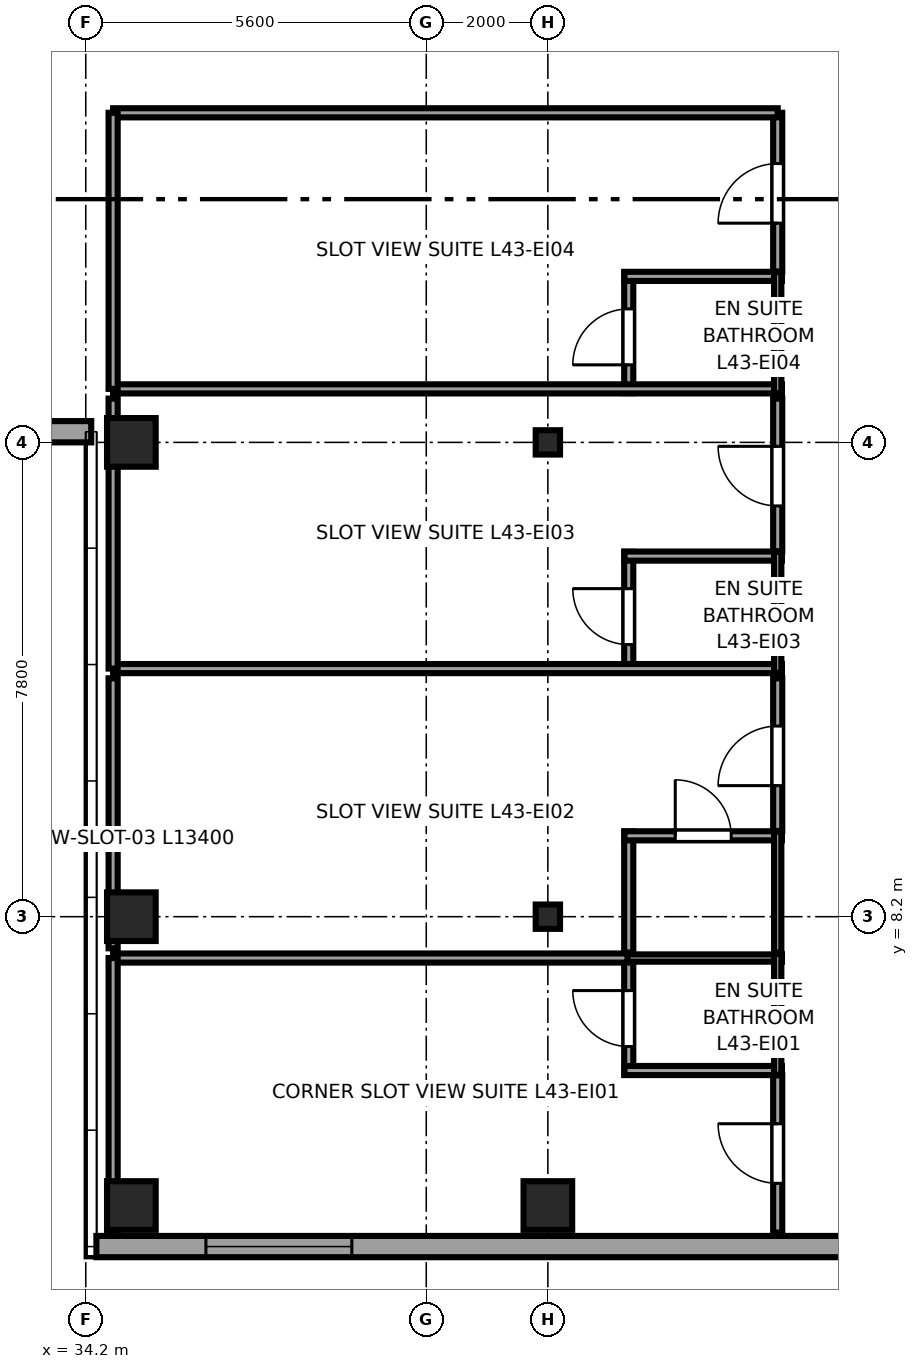
"""IFC4 building model, lengths in metres.
Left out: names, types, materials, properties, quantities, classifications, styles, units other than length and angle.
Written with IfcOpenShell. Run it as: python <this file> out.ifc"""

import sys

from ifc_helpers import new_model, si_unit, direction, frame, frame_2d, origin, origin_2d, place, context, subcontext, project, spatial, rectangle, i_section, extrude, source, transform, mapped, element, fill, save


model = new_model("IFC4")
c1 = context("Model", 3, precision=1e-05, world=origin(), true_north=direction((0.0, 1.0)))
c2 = subcontext(c1, "Body", "Model", "MODEL_VIEW")
j1 = project(units=[si_unit("LENGTHUNIT", "METRE"), si_unit("PLANEANGLEUNIT", "RADIAN")], contexts=[c1])
p1 = place(None, origin())
s1 = spatial("IfcSite", under=j1, at=p1, CompositionType="ELEMENT")
p2 = place(p1, origin())
s2 = spatial("IfcBuilding", under=s1, at=p2, CompositionType="ELEMENT")
p3 = place(p2, frame((0.0, 0.0, 164.8)))
s3 = spatial("IfcBuildingStorey", under=s2, at=p3, CompositionType="ELEMENT", Elevation=164.8)
m1 = source(origin(), c2, "Body", "SweptSolid", [
    extrude(rectangle(XDim=0.8, YDim=0.8, at=origin_2d()), origin(), (0.0, 0.0, 1.0), 3.55),
])
for number, where, z_axis, x_axis in (
    (1, (34.95, 3.45, 0.0), (0.0, 0.0, 1.0), (1.0, 0.0, 0.0)),
    (2, (34.95, 8.2, 0.0), (0.0, 0.0, 1.0), (1.0, 0.0, 0.0)),
    (3, (34.95, 16.0, 0.0), (0.0, 0.0, 1.0), (1.0, 0.0, 0.0)),
    (4, (41.8, 3.45, 0.0), (0.0, 0.0, 1.0), (1.0, 0.0, 0.0)),
):
    element("IfcColumn", number, at=place(p3, frame(where, z_axis=z_axis, x_axis=x_axis)), inside=s3, PredefinedType="COLUMN", context=c2, shape_type="MappedRepresentation", body=[
        mapped(m1, transform((0.0, 0.0, 0.0), x_axis=(1.0, 0.0, 0.0), y_axis=(0.0, 1.0, 0.0), z_axis=(0.0, 0.0, 1.0), scale=1.0)),
    ])
m2 = source(origin(), c2, "Body", "SweptSolid", [
    extrude(i_section(OverallWidth=0.4, OverallDepth=0.4, WebThickness=0.02, FlangeThickness=0.035, at=origin_2d()), origin(), (0.0, 0.0, 1.0), 3.55),
])
for number, where, z_axis, x_axis in (
    (5, (41.8, 8.2, 0.0), (0.0, 0.0, 1.0), (1.0, 0.0, 0.0)),
    (6, (41.8, 16.0, 0.0), (0.0, 0.0, 1.0), (1.0, 0.0, 0.0)),
):
    element("IfcColumn", number, at=place(p3, frame(where, z_axis=z_axis, x_axis=x_axis)), inside=s3, PredefinedType="COLUMN", context=c2, shape_type="MappedRepresentation", body=[
        mapped(m2, transform((0.0, 0.0, 0.0), x_axis=(1.0, 0.0, 0.0), y_axis=(0.0, 1.0, 0.0), z_axis=(0.0, 0.0, 1.0), scale=1.0)),
    ])
p4 = place(p3, frame((22.71, 16.175, 0.0), z_axis=(0.0, 0.0, 1.0), x_axis=(1.0, 0.0, 0.0)))
e7 = element("IfcWall", 7, at=p4, inside=s3, PredefinedType="SOLIDWALL", context=c2, shape_type="SweptSolid", body=[
    extrude(rectangle(XDim=11.58, YDim=0.35, at=frame_2d((5.79, 0.0))), origin(), (0.0, 0.0, 1.0), 2.758),
])
p5 = place(p4, frame((1.995, 0.0, 0.68)))
e8 = element("IfcOpeningElement", 8, at=p5, cuts=e7, PredefinedType="OPENING", context=c2, shape_type="SweptSolid", body=[
    extrude(rectangle(XDim=2.4, YDim=1.9, at=frame_2d((1.2, 0.95))), frame((0.0, 0.185, 0.0), z_axis=(0.0, -1.0, 0.0), x_axis=(1.0, 0.0, 0.0)), (0.0, 0.0, 1.0), 0.37),
])
p6 = place(p4, frame((7.185, 0.0, 0.68)))
e9 = element("IfcOpeningElement", 9, at=p6, cuts=e7, PredefinedType="OPENING", context=c2, shape_type="SweptSolid", body=[
    extrude(rectangle(XDim=2.4, YDim=1.9, at=frame_2d((1.2, 0.95))), frame((0.0, 0.185, 0.0), z_axis=(0.0, -1.0, 0.0), x_axis=(1.0, 0.0, 0.0)), (0.0, 0.0, 1.0), 0.37),
])
p7 = place(p3, frame((34.375, 2.775, 0.0), z_axis=(0.0, 0.0, 1.0), x_axis=(1.0, 0.0, 0.0)))
e10 = element("IfcWall", 10, at=p7, inside=s3, PredefinedType="SOLIDWALL", context=c2, shape_type="SweptSolid", body=[
    extrude(rectangle(XDim=15.608, YDim=0.35, at=frame_2d((7.804, 0.0))), origin(), (0.0, 0.0, 1.0), 3.37),
])
p8 = place(p7, frame((1.801, 0.0, 0.68)))
e11 = element("IfcOpeningElement", 11, at=p8, cuts=e10, PredefinedType="OPENING", context=c2, shape_type="SweptSolid", body=[
    extrude(rectangle(XDim=2.4, YDim=1.9, at=frame_2d((1.2, 0.95))), frame((0.0, 0.185, 0.0), z_axis=(0.0, -1.0, 0.0), x_axis=(1.0, 0.0, 0.0)), (0.0, 0.0, 1.0), 0.37),
])
p9 = place(p7, frame((13.616, 0.0, 0.62)))
e12 = element("IfcOpeningElement", 12, at=p9, cuts=e10, PredefinedType="OPENING", context=c2, shape_type="SweptSolid", body=[
    extrude(rectangle(XDim=1.5, YDim=1.55, at=frame_2d((0.75, 0.775))), frame((0.0, 0.185, 0.0), z_axis=(0.0, -1.0, 0.0), x_axis=(1.0, 0.0, 0.0)), (0.0, 0.0, 1.0), 0.37),
])
p10 = place(p3, frame((43.13, 5.6, 0.0), z_axis=(0.0, 0.0, 1.0), x_axis=(0.0, 1.0, 0.0)))
e13 = element("IfcWall", 13, at=p10, inside=s3, PredefinedType="PARTITIONING", context=c2, shape_type="SweptSolid", body=[
    extrude(rectangle(XDim=1.99, YDim=0.15, at=frame_2d((0.995, 0.0))), origin(), (0.0, 0.0, 1.0), 3.37),
])
p11 = place(p10, frame((0.465, 0.0, 0.0)))
e14 = element("IfcOpeningElement", 14, at=p11, cuts=e13, PredefinedType="OPENING", context=c2, shape_type="SweptSolid", body=[
    extrude(rectangle(XDim=0.92, YDim=2.01, at=frame_2d((0.46, 1.005))), frame((0.0, 0.085, 0.0), z_axis=(0.0, -1.0, 0.0), x_axis=(1.0, 0.0, 0.0)), (0.0, 0.0, 1.0), 0.17),
])
p12 = place(p3, frame((43.06, 5.67, 0.0), z_axis=(0.0, 0.0, 1.0), x_axis=(1.0, 0.0, 0.0)))
e15 = element("IfcWall", 15, at=p12, inside=s3, PredefinedType="PARTITIONING", context=c2, shape_type="SweptSolid", body=[
    extrude(rectangle(XDim=2.59, YDim=0.15, at=frame_2d((1.295, 0.0))), origin(), (0.0, 0.0, 1.0), 3.37),
])
p13 = place(p3, frame((43.06, 7.52, 0.0), z_axis=(0.0, 0.0, 1.0), x_axis=(1.0, 0.0, 0.0)))
e16 = element("IfcWall", 16, at=p13, inside=s3, PredefinedType="PLUMBINGWALL", context=c2, shape_type="SweptSolid", body=[
    extrude(rectangle(XDim=2.59, YDim=0.12, at=frame_2d((1.295, 0.0))), origin(), (0.0, 0.0, 1.0), 3.37),
])
p14 = place(p3, frame((45.58, 5.6, 0.0), z_axis=(0.0, 0.0, 1.0), x_axis=(0.0, 1.0, 0.0)))
e17 = element("IfcWall", 17, at=p14, inside=s3, PredefinedType="PLUMBINGWALL", context=c2, shape_type="SweptSolid", body=[
    extrude(rectangle(XDim=1.99, YDim=0.12, at=frame_2d((0.995, 0.0))), origin(), (0.0, 0.0, 1.0), 3.37),
])
p15 = place(p3, frame((43.13, 7.61, 0.0), z_axis=(0.0, 0.0, 1.0), x_axis=(0.0, 1.0, 0.0)))
e18 = element("IfcWall", 18, at=p15, inside=s3, PredefinedType="PARTITIONING", context=c2, shape_type="SweptSolid", body=[
    extrude(rectangle(XDim=1.99, YDim=0.15, at=frame_2d((0.995, 0.0))), origin(), (0.0, 0.0, 1.0), 3.37),
])
p16 = place(p3, frame((43.06, 9.53, 0.0), z_axis=(0.0, 0.0, 1.0), x_axis=(1.0, 0.0, 0.0)))
e19 = element("IfcWall", 19, at=p16, inside=s3, PredefinedType="PARTITIONING", context=c2, shape_type="SweptSolid", body=[
    extrude(rectangle(XDim=2.59, YDim=0.15, at=frame_2d((1.295, 0.0))), origin(), (0.0, 0.0, 1.0), 3.37),
])
p17 = place(p16, frame((0.835, 0.0, 0.0)))
e20 = element("IfcOpeningElement", 20, at=p17, cuts=e19, PredefinedType="OPENING", context=c2, shape_type="SweptSolid", body=[
    extrude(rectangle(XDim=0.92, YDim=2.01, at=frame_2d((0.46, 1.005))), frame((0.0, 0.085, 0.0), z_axis=(0.0, -1.0, 0.0), x_axis=(1.0, 0.0, 0.0)), (0.0, 0.0, 1.0), 0.17),
])
p18 = place(p3, frame((45.58, 7.61, 0.0), z_axis=(0.0, 0.0, 1.0), x_axis=(0.0, 1.0, 0.0)))
e21 = element("IfcWall", 21, at=p18, inside=s3, PredefinedType="PLUMBINGWALL", context=c2, shape_type="SweptSolid", body=[
    extrude(rectangle(XDim=1.99, YDim=0.12, at=frame_2d((0.995, 0.0))), origin(), (0.0, 0.0, 1.0), 3.001),
])
p19 = place(p3, frame((43.13, 12.21, 0.0), z_axis=(0.0, 0.0, 1.0), x_axis=(0.0, 1.0, 0.0)))
e22 = element("IfcWall", 22, at=p19, inside=s3, PredefinedType="PARTITIONING", context=c2, shape_type="SweptSolid", body=[
    extrude(rectangle(XDim=1.99, YDim=0.15, at=frame_2d((0.995, 0.0))), origin(), (0.0, 0.0, 1.0), 3.37),
])
p20 = place(p19, frame((0.465, 0.0, 0.0)))
e23 = element("IfcOpeningElement", 23, at=p20, cuts=e22, PredefinedType="OPENING", context=c2, shape_type="SweptSolid", body=[
    extrude(rectangle(XDim=0.92, YDim=2.01, at=frame_2d((0.46, 1.005))), frame((0.0, 0.085, 0.0), z_axis=(0.0, -1.0, 0.0), x_axis=(1.0, 0.0, 0.0)), (0.0, 0.0, 1.0), 0.17),
])
p21 = place(p3, frame((34.65, 12.28, 0.0), z_axis=(0.0, 0.0, 1.0), x_axis=(1.0, 0.0, 0.0)))
e24 = element("IfcWall", 24, at=p21, inside=s3, PredefinedType="PARTITIONING", context=c2, shape_type="SweptSolid", body=[
    extrude(rectangle(XDim=11.0, YDim=0.15, at=frame_2d((5.5, 0.0))), origin(), (0.0, 0.0, 1.0), 3.37),
])
p22 = place(p3, frame((43.06, 14.13, 0.0), z_axis=(0.0, 0.0, 1.0), x_axis=(1.0, 0.0, 0.0)))
e25 = element("IfcWall", 25, at=p22, inside=s3, PredefinedType="PARTITIONING", context=c2, shape_type="SweptSolid", body=[
    extrude(rectangle(XDim=2.59, YDim=0.15, at=frame_2d((1.295, 0.0))), origin(), (0.0, 0.0, 1.0), 3.37),
])
p23 = place(p3, frame((45.58, 12.21, 0.0), z_axis=(0.0, 0.0, 1.0), x_axis=(0.0, 1.0, 0.0)))
e26 = element("IfcWall", 26, at=p23, inside=s3, PredefinedType="PLUMBINGWALL", context=c2, shape_type="SweptSolid", body=[
    extrude(rectangle(XDim=1.99, YDim=0.12, at=frame_2d((0.995, 0.0))), origin(), (0.0, 0.0, 1.0), 3.001),
])
p24 = place(p3, frame((43.13, 16.81, 0.0), z_axis=(0.0, 0.0, 1.0), x_axis=(0.0, 1.0, 0.0)))
e27 = element("IfcWall", 27, at=p24, inside=s3, PredefinedType="PARTITIONING", context=c2, shape_type="SweptSolid", body=[
    extrude(rectangle(XDim=1.99, YDim=0.15, at=frame_2d((0.995, 0.0))), origin(), (0.0, 0.0, 1.0), 3.37),
])
p25 = place(p24, frame((0.465, 0.0, 0.0)))
e28 = element("IfcOpeningElement", 28, at=p25, cuts=e27, PredefinedType="OPENING", context=c2, shape_type="SweptSolid", body=[
    extrude(rectangle(XDim=0.92, YDim=2.01, at=frame_2d((0.46, 1.005))), frame((0.0, 0.085, 0.0), z_axis=(0.0, -1.0, 0.0), x_axis=(1.0, 0.0, 0.0)), (0.0, 0.0, 1.0), 0.17),
])
p26 = place(p3, frame((34.65, 16.88, 0.0), z_axis=(0.0, 0.0, 1.0), x_axis=(1.0, 0.0, 0.0)))
e29 = element("IfcWall", 29, at=p26, inside=s3, PredefinedType="PARTITIONING", context=c2, shape_type="SweptSolid", body=[
    extrude(rectangle(XDim=11.0, YDim=0.15, at=frame_2d((5.5, 0.0))), origin(), (0.0, 0.0, 1.0), 3.37),
])
p27 = place(p3, frame((43.06, 18.73, 0.0), z_axis=(0.0, 0.0, 1.0), x_axis=(1.0, 0.0, 0.0)))
e30 = element("IfcWall", 30, at=p27, inside=s3, PredefinedType="PARTITIONING", context=c2, shape_type="SweptSolid", body=[
    extrude(rectangle(XDim=2.59, YDim=0.15, at=frame_2d((1.295, 0.0))), origin(), (0.0, 0.0, 1.0), 3.37),
])
p28 = place(p3, frame((45.58, 16.81, 0.0), z_axis=(0.0, 0.0, 1.0), x_axis=(0.0, 1.0, 0.0)))
e31 = element("IfcWall", 31, at=p28, inside=s3, PredefinedType="PLUMBINGWALL", context=c2, shape_type="SweptSolid", body=[
    extrude(rectangle(XDim=1.99, YDim=0.12, at=frame_2d((0.995, 0.0))), origin(), (0.0, 0.0, 1.0), 3.001),
])
p29 = place(p3, frame((45.58, 3.005, 0.0), z_axis=(0.0, 0.0, 1.0), x_axis=(0.0, 1.0, 0.0)))
e32 = element("IfcWall", 32, at=p29, inside=s3, PredefinedType="PARTITIONING", context=c2, shape_type="SweptSolid", body=[
    extrude(rectangle(XDim=2.585, YDim=0.15, at=frame_2d((1.292, 0.0))), origin(), (0.0, 0.0, 1.0), 3.37),
])
p30 = place(p29, frame((0.81, 0.0, 0.0)))
e33 = element("IfcOpeningElement", 33, at=p30, cuts=e32, PredefinedType="OPENING", context=c2, shape_type="SweptSolid", body=[
    extrude(rectangle(XDim=0.98, YDim=2.12, at=frame_2d((0.49, 1.06))), frame((0.0, 0.085, 0.0), z_axis=(0.0, -1.0, 0.0), x_axis=(1.0, 0.0, 0.0)), (0.0, 0.0, 1.0), 0.17),
])
p31 = place(p3, frame((34.65, 7.52, 0.0), z_axis=(0.0, 0.0, 1.0), x_axis=(1.0, 0.0, 0.0)))
e34 = element("IfcWall", 34, at=p31, inside=s3, PredefinedType="PARTITIONING", context=c2, shape_type="SweptSolid", body=[
    extrude(rectangle(XDim=8.46, YDim=0.15, at=frame_2d((4.23, 0.0))), origin(), (0.0, 0.0, 1.0), 3.37),
])
p32 = place(p3, frame((34.65, 3.005, 0.0), z_axis=(0.0, 0.0, 1.0), x_axis=(0.0, 1.0, 0.0)))
e35 = element("IfcWall", 35, at=p32, inside=s3, PredefinedType="PARTITIONING", context=c2, shape_type="SweptSolid", body=[
    extrude(rectangle(XDim=4.515, YDim=0.15, at=frame_2d((2.258, 0.0))), origin(), (0.0, 0.0, 1.0), 3.37),
])
p33 = place(p3, frame((45.58, 9.61, 0.0), z_axis=(0.0, 0.0, 1.0), x_axis=(0.0, 1.0, 0.0)))
e36 = element("IfcWall", 36, at=p33, inside=s3, PredefinedType="PARTITIONING", context=c2, shape_type="SweptSolid", body=[
    extrude(rectangle(XDim=2.51, YDim=0.15, at=frame_2d((1.255, 0.0))), origin(), (0.0, 0.0, 1.0), 3.001),
])
p34 = place(p33, frame((0.745, 0.0, 0.0)))
e37 = element("IfcOpeningElement", 37, at=p34, cuts=e36, PredefinedType="OPENING", context=c2, shape_type="SweptSolid", body=[
    extrude(rectangle(XDim=0.98, YDim=2.12, at=frame_2d((0.49, 1.06))), frame((0.0, 0.085, 0.0), z_axis=(0.0, -1.0, 0.0), x_axis=(1.0, 0.0, 0.0)), (0.0, 0.0, 1.0), 0.17),
])
p35 = place(p3, frame((34.65, 7.68, 0.0), z_axis=(0.0, 0.0, 1.0), x_axis=(0.0, 1.0, 0.0)))
e38 = element("IfcWall", 38, at=p35, inside=s3, PredefinedType="PARTITIONING", context=c2, shape_type="SweptSolid", body=[
    extrude(rectangle(XDim=4.44, YDim=0.15, at=frame_2d((2.22, 0.0))), origin(), (0.0, 0.0, 1.0), 3.37),
])
p36 = place(p3, frame((45.58, 14.21, 0.0), z_axis=(0.0, 0.0, 1.0), x_axis=(0.0, 1.0, 0.0)))
e39 = element("IfcWall", 39, at=p36, inside=s3, PredefinedType="PARTITIONING", context=c2, shape_type="SweptSolid", body=[
    extrude(rectangle(XDim=2.51, YDim=0.15, at=frame_2d((1.255, 0.0))), origin(), (0.0, 0.0, 1.0), 3.001),
])
p37 = place(p36, frame((0.745, 0.0, 0.0)))
e40 = element("IfcOpeningElement", 40, at=p37, cuts=e39, PredefinedType="OPENING", context=c2, shape_type="SweptSolid", body=[
    extrude(rectangle(XDim=0.98, YDim=2.12, at=frame_2d((0.49, 1.06))), frame((0.0, 0.085, 0.0), z_axis=(0.0, -1.0, 0.0), x_axis=(1.0, 0.0, 0.0)), (0.0, 0.0, 1.0), 0.17),
])
p38 = place(p3, frame((34.65, 12.28, 0.0), z_axis=(0.0, 0.0, 1.0), x_axis=(0.0, 1.0, 0.0)))
e41 = element("IfcWall", 41, at=p38, inside=s3, PredefinedType="PARTITIONING", context=c2, shape_type="SweptSolid", body=[
    extrude(rectangle(XDim=4.44, YDim=0.15, at=frame_2d((2.22, 0.0))), origin(), (0.0, 0.0, 1.0), 3.37),
])
p39 = place(p3, frame((45.58, 18.81, 0.0), z_axis=(0.0, 0.0, 1.0), x_axis=(0.0, 1.0, 0.0)))
e42 = element("IfcWall", 42, at=p39, inside=s3, PredefinedType="PARTITIONING", context=c2, shape_type="SweptSolid", body=[
    extrude(rectangle(XDim=2.61, YDim=0.15, at=frame_2d((1.305, 0.0))), origin(), (0.0, 0.0, 1.0), 3.001),
])
p40 = place(p39, frame((0.795, 0.0, 0.0)))
e43 = element("IfcOpeningElement", 43, at=p40, cuts=e42, PredefinedType="OPENING", context=c2, shape_type="SweptSolid", body=[
    extrude(rectangle(XDim=0.98, YDim=2.12, at=frame_2d((0.49, 1.06))), frame((0.0, 0.085, 0.0), z_axis=(0.0, -1.0, 0.0), x_axis=(1.0, 0.0, 0.0)), (0.0, 0.0, 1.0), 0.17),
])
p41 = place(p3, frame((34.65, 21.42, 0.0), z_axis=(0.0, 0.0, 1.0), x_axis=(1.0, 0.0, 0.0)))
e44 = element("IfcWall", 44, at=p41, inside=s3, PredefinedType="PARTITIONING", context=c2, shape_type="SweptSolid", body=[
    extrude(rectangle(XDim=10.93, YDim=0.15, at=frame_2d((5.465, 0.0))), origin(), (0.0, 0.0, 1.0), 3.37),
])
p42 = place(p3, frame((34.65, 16.88, 0.0), z_axis=(0.0, 0.0, 1.0), x_axis=(0.0, 1.0, 0.0)))
e45 = element("IfcWall", 45, at=p42, inside=s3, PredefinedType="PARTITIONING", context=c2, shape_type="SweptSolid", body=[
    extrude(rectangle(XDim=4.54, YDim=0.15, at=frame_2d((2.27, 0.0))), origin(), (0.0, 0.0, 1.0), 3.37),
])
m3 = source(origin(), c2, "Body", "SweptSolid", [
    extrude(rectangle(XDim=2.4, YDim=1.9, at=frame_2d((1.2, 0.95))), frame((0.0, 0.09, 0.0), z_axis=(0.0, -1.0, 0.0), x_axis=(1.0, 0.0, 0.0)), (0.0, 0.0, 1.0), 0.06),
])
p43 = place(p8, origin())
e46 = element("IfcWindow", 46, at=p43, inside=s3, PartitioningType="TRIPLE_PANEL_HORIZONTAL", PredefinedType="WINDOW", context=c2, shape_type="MappedRepresentation", body=[
    mapped(m3, transform((0.0, 0.0, 0.0), x_axis=(1.0, 0.0, 0.0), y_axis=(0.0, 1.0, 0.0), z_axis=(0.0, 0.0, 1.0), scale=1.0)),
])
fill(e11, e46)
m4 = source(origin(), c2, "Body", "SweptSolid", [
    extrude(rectangle(XDim=0.92, YDim=2.01, at=frame_2d((0.46, 1.005))), frame((0.0, 0.025, 0.0), z_axis=(0.0, -1.0, 0.0), x_axis=(1.0, 0.0, 0.0)), (0.0, 0.0, 1.0), 0.05),
])
p44 = place(p11, origin())
e47 = element("IfcDoor", 47, at=p44, inside=s3, OperationType="SINGLE_SWING_RIGHT", PredefinedType="DOOR", context=c2, shape_type="MappedRepresentation", body=[
    mapped(m4, transform((0.0, 0.0, 0.0), x_axis=(1.0, 0.0, 0.0), y_axis=(0.0, 1.0, 0.0), z_axis=(0.0, 0.0, 1.0), scale=1.0)),
])
fill(e14, e47)
p45 = place(p17, origin())
e48 = element("IfcDoor", 48, at=p45, inside=s3, OperationType="SINGLE_SWING_LEFT", PredefinedType="DOOR", context=c2, shape_type="MappedRepresentation", body=[
    mapped(m4, transform((0.0, 0.0, 0.0), x_axis=(1.0, 0.0, 0.0), y_axis=(0.0, 1.0, 0.0), z_axis=(0.0, 0.0, 1.0), scale=1.0)),
])
fill(e20, e48)
p46 = place(p20, origin())
e49 = element("IfcDoor", 49, at=p46, inside=s3, OperationType="SINGLE_SWING_RIGHT", PredefinedType="DOOR", context=c2, shape_type="MappedRepresentation", body=[
    mapped(m4, transform((0.0, 0.0, 0.0), x_axis=(1.0, 0.0, 0.0), y_axis=(0.0, 1.0, 0.0), z_axis=(0.0, 0.0, 1.0), scale=1.0)),
])
fill(e23, e49)
p47 = place(p25, origin())
e50 = element("IfcDoor", 50, at=p47, inside=s3, OperationType="SINGLE_SWING_LEFT", PredefinedType="DOOR", context=c2, shape_type="MappedRepresentation", body=[
    mapped(m4, transform((0.0, 0.0, 0.0), x_axis=(1.0, 0.0, 0.0), y_axis=(0.0, 1.0, 0.0), z_axis=(0.0, 0.0, 1.0), scale=1.0)),
])
fill(e28, e50)
m5 = source(origin(), c2, "Body", "SweptSolid", [
    extrude(rectangle(XDim=0.98, YDim=2.12, at=frame_2d((0.49, 1.06))), frame((0.0, 0.025, 0.0), z_axis=(0.0, -1.0, 0.0), x_axis=(1.0, 0.0, 0.0)), (0.0, 0.0, 1.0), 0.05),
])
p48 = place(p30, origin())
e51 = element("IfcDoor", 51, at=p48, inside=s3, OperationType="SINGLE_SWING_RIGHT", PredefinedType="DOOR", context=c2, shape_type="MappedRepresentation", body=[
    mapped(m5, transform((0.0, 0.0, 0.0), x_axis=(1.0, 0.0, 0.0), y_axis=(0.0, 1.0, 0.0), z_axis=(0.0, 0.0, 1.0), scale=1.0)),
])
fill(e33, e51)
p49 = place(p34, origin())
e52 = element("IfcDoor", 52, at=p49, inside=s3, OperationType="SINGLE_SWING_LEFT", PredefinedType="DOOR", context=c2, shape_type="MappedRepresentation", body=[
    mapped(m5, transform((0.0, 0.0, 0.0), x_axis=(1.0, 0.0, 0.0), y_axis=(0.0, 1.0, 0.0), z_axis=(0.0, 0.0, 1.0), scale=1.0)),
])
fill(e37, e52)
p50 = place(p37, origin())
e53 = element("IfcDoor", 53, at=p50, inside=s3, OperationType="SINGLE_SWING_RIGHT", PredefinedType="DOOR", context=c2, shape_type="MappedRepresentation", body=[
    mapped(m5, transform((0.0, 0.0, 0.0), x_axis=(1.0, 0.0, 0.0), y_axis=(0.0, 1.0, 0.0), z_axis=(0.0, 0.0, 1.0), scale=1.0)),
])
fill(e40, e53)
p51 = place(p40, origin())
e54 = element("IfcDoor", 54, at=p51, inside=s3, OperationType="SINGLE_SWING_LEFT", PredefinedType="DOOR", context=c2, shape_type="MappedRepresentation", body=[
    mapped(m5, transform((0.0, 0.0, 0.0), x_axis=(1.0, 0.0, 0.0), y_axis=(0.0, 1.0, 0.0), z_axis=(0.0, 0.0, 1.0), scale=1.0)),
])
fill(e43, e54)
save(model, sys.argv[1])
